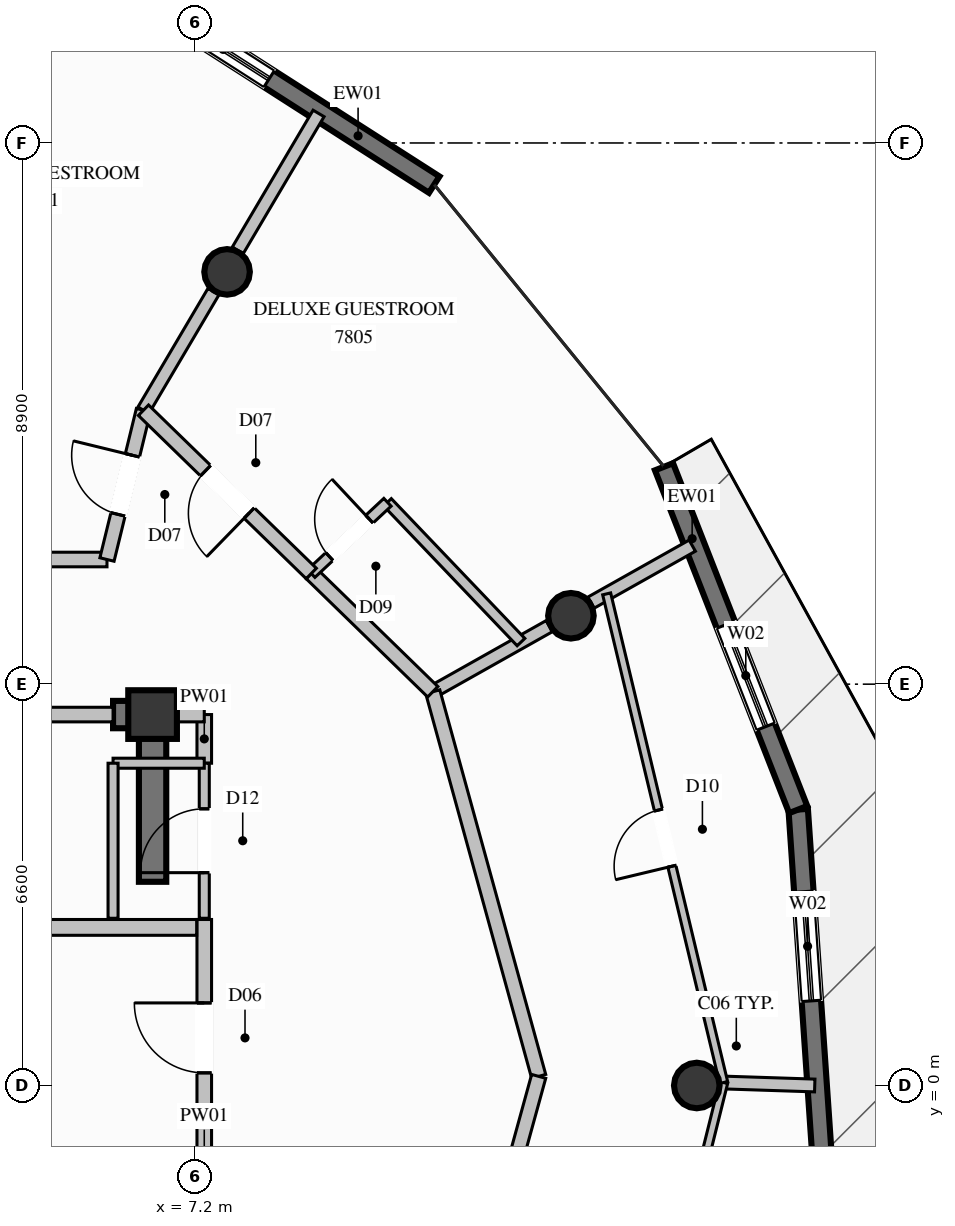
"""IFC4 building model, lengths in metres.
Left out: names, types, materials, properties, quantities, classifications, styles, units other than length and angle.
Written with IfcOpenShell. Run it as: python <this file> out.ifc"""

import sys

from ifc_helpers import new_model, si_unit, direction, frame, frame_2d, origin, origin_2d, place, context, subcontext, project, spatial, rectangle, circle, extrude, element, fill, save


model = new_model("IFC4")
c1 = context("Model", 3, precision=1e-05, world=origin(), true_north=direction((0.0, 1.0)))
c2 = subcontext(c1, "Body", "Model", "MODEL_VIEW")
j1 = project(units=[si_unit("LENGTHUNIT", "METRE"), si_unit("PLANEANGLEUNIT", "RADIAN")], contexts=[c1])
p1 = place(None, origin())
s1 = spatial("IfcSite", under=j1, at=p1, CompositionType="ELEMENT")
p2 = place(p1, origin())
s2 = spatial("IfcBuilding", under=s1, at=p2, CompositionType="ELEMENT")
p3 = place(p2, frame((0.0, 0.0, 293.4)))
s3 = spatial("IfcBuildingStorey", under=s2, at=p3, CompositionType="ELEMENT", Elevation=293.4)
p4 = place(p3, frame((6.5, 6.1, 0.0), z_axis=(0.0, 0.0, 1.0), x_axis=(1.0, 0.0, 0.0)))
e1 = element("IfcColumn", 1, at=p4, inside=s3, PredefinedType="COLUMN", context=c2, shape_type="SweptSolid", body=[
    extrude(rectangle(XDim=0.8, YDim=0.8, at=origin_2d()), origin(), (0.0, 0.0, 1.0), 3.8),
])
p5 = place(p3, frame((5.85, 6.1, 0.0), z_axis=(0.0, 0.0, 1.0), x_axis=(1.0, 0.0, 0.0)))
e2 = element("IfcWall", 2, at=p5, inside=s3, PredefinedType="SHEAR", context=c2, shape_type="SweptSolid", body=[
    extrude(rectangle(XDim=0.425, YDim=0.45, at=frame_2d((0.212, 0.0))), origin(), (0.0, 0.0, 1.0), 3.8),
])
p6 = place(p3, frame((6.5, 3.35, 0.0), z_axis=(0.0, 0.0, 1.0), x_axis=(0.0, 1.0, 0.0)))
e3 = element("IfcWall", 3, at=p6, inside=s3, PredefinedType="SHEAR", context=c2, shape_type="SweptSolid", body=[
    extrude(rectangle(XDim=2.975, YDim=0.45, at=frame_2d((1.487, 0.0))), origin(), (0.0, 0.0, 1.0), 3.8),
])
for number, where, z_axis, x_axis in (
    (4, (15.45, 0.0, 0.0), (0.0, 0.0, 1.0), (1.0, 0.0, 0.0)),
    (5, (13.38, 7.725, 0.0), (0.0, 0.0, 1.0), (1.0, 0.0, 0.0)),
    (6, (7.725, 13.38, 0.0), (0.0, 0.0, 1.0), (1.0, 0.0, 0.0)),
):
    element("IfcColumn", number, at=place(p3, frame(where, z_axis=z_axis, x_axis=x_axis)), inside=s3, PredefinedType="COLUMN", context=c2, shape_type="SweptSolid", body=[
        extrude(circle(Radius=0.375, at=origin_2d()), origin(), (0.0, 0.0, 1.0), 3.8),
    ])
p7 = place(p3, frame((17.118, 4.538, 0.0), z_axis=(0.0, 0.0, 1.0), x_axis=(0.068571155559, -0.997646228192, 0.0)))
e7 = element("IfcWall", 7, at=p7, inside=s3, PredefinedType="SOLIDWALL", context=c2, shape_type="SweptSolid", body=[
    extrude(rectangle(XDim=6.095, YDim=0.32, at=frame_2d((3.048, 0.0))), origin(), (0.0, 0.0, 1.0), 3.57),
])
p8 = place(p7, frame((1.354, 0.0, 0.35)))
e8 = element("IfcOpeningElement", 8, at=p8, cuts=e7, PredefinedType="OPENING", context=c2, shape_type="SweptSolid", body=[
    extrude(rectangle(XDim=1.8, YDim=2.6, at=frame_2d((0.9, 1.3))), frame((0.0, 0.17, 0.0), z_axis=(0.0, -1.0, 0.0), x_axis=(1.0, 0.0, 0.0)), (0.0, 0.0, 1.0), 0.34),
])
p9 = place(p3, frame((14.911, 10.175, 0.0), z_axis=(0.0, 0.0, 1.0), x_axis=(0.364580296342, -0.931171953787, 0.0)))
e9 = element("IfcWall", 9, at=p9, inside=s3, PredefinedType="SOLIDWALL", context=c2, shape_type="SweptSolid", body=[
    extrude(rectangle(XDim=6.054, YDim=0.32, at=frame_2d((3.027, 0.0))), origin(), (0.0, 0.0, 1.0), 3.57),
])
p10 = place(p9, frame((2.789, 0.0, 0.35)))
e10 = element("IfcOpeningElement", 10, at=p10, cuts=e9, PredefinedType="OPENING", context=c2, shape_type="SweptSolid", body=[
    extrude(rectangle(XDim=1.8, YDim=2.6, at=frame_2d((0.9, 1.3))), frame((0.0, 0.17, 0.0), z_axis=(0.0, -1.0, 0.0), x_axis=(1.0, 0.0, 0.0)), (0.0, 0.0, 1.0), 0.34),
])
p11 = place(p3, frame((6.15, 18.006, 0.0), z_axis=(0.0, 0.0, 1.0), x_axis=(0.842074251432, -0.539361618095, 0.0)))
e11 = element("IfcWall", 11, at=p11, inside=s3, PredefinedType="SOLIDWALL", context=c2, shape_type="SweptSolid", body=[
    extrude(rectangle(XDim=5.917, YDim=0.32, at=frame_2d((2.958, 0.0))), origin(), (0.0, 0.0, 1.0), 3.57),
])
p12 = place(p11, frame((0.892, 0.0, 0.35)))
e12 = element("IfcOpeningElement", 12, at=p12, cuts=e11, PredefinedType="OPENING", context=c2, shape_type="SweptSolid", body=[
    extrude(rectangle(XDim=1.8, YDim=2.6, at=frame_2d((0.9, 1.3))), frame((0.0, 0.17, 0.0), z_axis=(0.0, -1.0, 0.0), x_axis=(1.0, 0.0, 0.0)), (0.0, 0.0, 1.0), 0.34),
])
p13 = place(p3, frame((7.35, -2.34, 0.0), z_axis=(0.0, 0.0, 1.0), x_axis=(0.0, 1.0, 0.0)))
e13 = element("IfcWall", 13, at=p13, inside=s3, PredefinedType="PARTITIONING", context=c2, shape_type="SweptSolid", body=[
    extrude(rectangle(XDim=5.07, YDim=0.24, at=frame_2d((2.535, 0.0))), origin(), (0.0, 0.0, 1.0), 2.655),
])
p14 = place(p13, frame((2.548, 0.0, 0.0)))
e14 = element("IfcOpeningElement", 14, at=p14, cuts=e13, PredefinedType="OPENING", context=c2, shape_type="SweptSolid", body=[
    extrude(rectangle(XDim=1.15, YDim=2.2, at=frame_2d((0.575, 1.1))), frame((0.0, 0.13, 0.0), z_axis=(0.0, -1.0, 0.0), x_axis=(1.0, 0.0, 0.0)), (0.0, 0.0, 1.0), 0.26),
])
p15 = place(p3, frame((4.13, 2.6, 0.0), z_axis=(0.0, 0.0, 1.0), x_axis=(1.0, 0.0, 0.0)))
e15 = element("IfcWall", 15, at=p15, inside=s3, PredefinedType="PARTITIONING", context=c2, shape_type="SweptSolid", body=[
    extrude(rectangle(XDim=3.095, YDim=0.26, at=frame_2d((1.548, 0.0))), origin(), (0.0, 0.0, 1.0), 3.57),
])
p16 = place(p3, frame((-7.35, 8.65, 0.0), z_axis=(0.0, 0.0, 1.0), x_axis=(1.0, 0.0, 0.0)))
e16 = element("IfcWall", 16, at=p16, inside=s3, PredefinedType="PARTITIONING", context=c2, shape_type="SweptSolid", body=[
    extrude(rectangle(XDim=13.1, YDim=0.24, at=frame_2d((6.55, 0.0))), origin(), (0.0, 0.0, 1.0), 3.57),
])
p17 = place(p3, frame((3.0, 6.1, 0.0), z_axis=(0.0, 0.0, 1.0), x_axis=(1.0, 0.0, 0.0)))
e17 = element("IfcWall", 17, at=p17, inside=s3, PredefinedType="PARTITIONING", context=c2, shape_type="SweptSolid", body=[
    extrude(rectangle(XDim=2.85, YDim=0.24, at=frame_2d((1.425, 0.0))), origin(), (0.0, 0.0, 1.0), 2.655),
])
p18 = place(p3, frame((7.35, 5.3, 0.0), z_axis=(0.0, 0.0, 1.0), x_axis=(0.0, 1.0, 0.0)))
e18 = element("IfcWall", 18, at=p18, inside=s3, PredefinedType="PARTITIONING", context=c2, shape_type="SweptSolid", body=[
    extrude(rectangle(XDim=0.8, YDim=0.24, at=frame_2d((0.4, 0.0))), origin(), (0.0, 0.0, 1.0), 2.655),
])
p19 = place(p3, frame((6.5, 6.1, 0.0), z_axis=(0.0, 0.0, 1.0), x_axis=(1.0, 0.0, 0.0)))
e19 = element("IfcWall", 19, at=p19, inside=s3, PredefinedType="PARTITIONING", context=c2, shape_type="SweptSolid", body=[
    extrude(rectangle(XDim=0.85, YDim=0.24, at=frame_2d((0.425, 0.0))), origin(), (0.0, 0.0, 1.0), 3.011),
])
p20 = place(p3, frame((7.35, 2.75, 0.0), z_axis=(0.0, 0.0, 1.0), x_axis=(0.0, 1.0, 0.0)))
e20 = element("IfcWall", 20, at=p20, inside=s3, PredefinedType="PARTITIONING", context=c2, shape_type="SweptSolid", body=[
    extrude(rectangle(XDim=2.55, YDim=0.165, at=frame_2d((1.275, 0.0))), origin(), (0.0, 0.0, 1.0), 3.57),
])
p21 = place(p20, frame((0.75, 0.0, 0.0)))
e21 = element("IfcOpeningElement", 21, at=p21, cuts=e20, PredefinedType="OPENING", context=c2, shape_type="SweptSolid", body=[
    extrude(rectangle(XDim=1.05, YDim=2.15, at=frame_2d((0.525, 1.075))), frame((0.0, 0.093, 0.0), z_axis=(0.0, -1.0, 0.0), x_axis=(1.0, 0.0, 0.0)), (0.0, 0.0, 1.0), 0.185),
])
p22 = place(p3, frame((7.35, 5.3, 0.0), z_axis=(0.0, 0.0, 1.0), x_axis=(-1.0, 0.0, 0.0)))
e22 = element("IfcWall", 22, at=p22, inside=s3, PredefinedType="PARTITIONING", context=c2, shape_type="SweptSolid", body=[
    extrude(rectangle(XDim=1.5, YDim=0.165, at=frame_2d((0.75, 0.0))), origin(), (0.0, 0.0, 1.0), 2.655),
])
p23 = place(p3, frame((5.85, 5.3, 0.0), z_axis=(0.0, 0.0, 1.0), x_axis=(0.0, -1.0, 0.0)))
e23 = element("IfcWall", 23, at=p23, inside=s3, PredefinedType="PARTITIONING", context=c2, shape_type="SweptSolid", body=[
    extrude(rectangle(XDim=2.55, YDim=0.165, at=frame_2d((1.275, 0.0))), origin(), (0.0, 0.0, 1.0), 2.655),
])
p24 = place(p3, frame((11.108, 6.475, 0.0), z_axis=(0.0, 0.0, 1.0), x_axis=(0.87136196096, 0.490640737192, 0.0)))
e24 = element("IfcWall", 24, at=p24, inside=s3, PredefinedType="PARTITIONING", context=c2, shape_type="SweptSolid", body=[
    extrude(rectangle(XDim=2.199, YDim=0.21, at=frame_2d((1.1, 0.0))), origin(), (0.0, 0.0, 1.0), 3.011),
])
p25 = place(p3, frame((13.711, 7.941, 0.0), z_axis=(0.0, 0.0, 1.0), x_axis=(0.871479967714, 0.490431102065, 0.0)))
e25 = element("IfcWall", 25, at=p25, inside=s3, PredefinedType="PARTITIONING", context=c2, shape_type="SweptSolid", body=[
    extrude(rectangle(XDim=1.911, YDim=0.21, at=frame_2d((0.955, 0.0))), origin(), (0.0, 0.0, 1.0), 3.57),
])
p26 = place(p3, frame((6.35, 11.105, 0.0), z_axis=(0.0, 0.0, 1.0), x_axis=(0.50828242616, 0.86119044076, 0.0)))
e26 = element("IfcWall", 26, at=p26, inside=s3, PredefinedType="PARTITIONING", context=c2, shape_type="SweptSolid", body=[
    extrude(rectangle(XDim=2.264, YDim=0.21, at=frame_2d((1.132, 0.0))), origin(), (0.0, 0.0, 1.0), 3.011),
])
p27 = place(p3, frame((7.901, 13.734, 0.0), z_axis=(0.0, 0.0, 1.0), x_axis=(0.508235422894, 0.861218180786, 0.0)))
e27 = element("IfcWall", 27, at=p27, inside=s3, PredefinedType="PARTITIONING", context=c2, shape_type="SweptSolid", body=[
    extrude(rectangle(XDim=2.615, YDim=0.21, at=frame_2d((1.308, 0.0))), origin(), (0.0, 0.0, 1.0), 3.57),
])
p28 = place(p3, frame((5.75, 8.65, 0.0), z_axis=(0.0, 0.0, 1.0), x_axis=(0.237440936779, 0.97140197732, 0.0)))
e28 = element("IfcWall", 28, at=p28, inside=s3, PredefinedType="PARTITIONING", context=c2, shape_type="SweptSolid", body=[
    extrude(rectangle(XDim=2.527, YDim=0.24, at=frame_2d((1.264, 0.0))), origin(), (0.0, 0.0, 1.0), 3.57),
])
p29 = place(p28, frame((0.764, 0.0, 0.0)))
e29 = element("IfcOpeningElement", 29, at=p29, cuts=e28, PredefinedType="OPENING", context=c2, shape_type="SweptSolid", body=[
    extrude(rectangle(XDim=1.0, YDim=2.2, at=frame_2d((0.5, 1.1))), frame((0.0, 0.13, 0.0), z_axis=(0.0, -1.0, 0.0), x_axis=(1.0, 0.0, 0.0)), (0.0, 0.0, 1.0), 0.26),
])
p30 = place(p3, frame((15.892, 0.049, 0.0), z_axis=(0.0, 0.0, 1.0), x_axis=(0.99946372997, -0.032745266459, 0.0)))
e30 = element("IfcWall", 30, at=p30, inside=s3, PredefinedType="PARTITIONING", context=c2, shape_type="SweptSolid", body=[
    extrude(rectangle(XDim=1.499, YDim=0.21, at=frame_2d((0.749, 0.0))), origin(), (0.0, 0.0, 1.0), 3.57),
])
p31 = place(p3, frame((12.85, 0.15, 0.0), z_axis=(0.0, 0.0, 1.0), x_axis=(-0.265547396414, 0.964097806375, 0.0)))
e31 = element("IfcWall", 31, at=p31, inside=s3, PredefinedType="PARTITIONING", context=c2, shape_type="SweptSolid", body=[
    extrude(rectangle(XDim=6.561, YDim=0.24, at=frame_2d((3.28, 0.0))), origin(), (0.0, 0.0, 1.0), 3.57),
])
p32 = place(p3, frame((11.84, -3.518, 0.0), z_axis=(0.0, 0.0, 1.0), x_axis=(0.265478632156, 0.9641167439, 0.0)))
e32 = element("IfcWall", 32, at=p32, inside=s3, PredefinedType="PARTITIONING", context=c2, shape_type="SweptSolid", body=[
    extrude(rectangle(XDim=3.804, YDim=0.24, at=frame_2d((1.902, 0.0))), origin(), (0.0, 0.0, 1.0), 3.57),
])
p33 = place(p32, frame((1.352, 0.0, 0.0)))
e33 = element("IfcOpeningElement", 33, at=p33, cuts=e32, PredefinedType="OPENING", context=c2, shape_type="SweptSolid", body=[
    extrude(rectangle(XDim=1.1, YDim=2.3, at=frame_2d((0.55, 1.15))), frame((0.0, 0.13, 0.0), z_axis=(0.0, -1.0, 0.0), x_axis=(1.0, 0.0, 0.0)), (0.0, 0.0, 1.0), 0.26),
])
p34 = place(p3, frame((13.901, -7.947, 0.0), z_axis=(0.0, 0.0, 1.0), x_axis=(0.241643206993, 0.970365168642, 0.0)))
e34 = element("IfcWall", 34, at=p34, inside=s3, PredefinedType="PARTITIONING", context=c2, shape_type="SweptSolid", body=[
    extrude(rectangle(XDim=8.24, YDim=0.135, at=frame_2d((4.12, 0.0))), origin(), (0.0, 0.0, 1.0), 3.138),
])
p35 = place(p34, frame((3.645, 0.0, 0.0)))
e35 = element("IfcOpeningElement", 35, at=p35, cuts=e34, PredefinedType="OPENING", context=c2, shape_type="SweptSolid", body=[
    extrude(rectangle(XDim=0.95, YDim=2.1, at=frame_2d((0.475, 1.05))), frame((0.0, 0.078, 0.0), z_axis=(0.0, -1.0, 0.0), x_axis=(1.0, 0.0, 0.0)), (0.0, 0.0, 1.0), 0.155),
])
p36 = place(p3, frame((15.892, 0.049, 0.0), z_axis=(0.0, 0.0, 1.0), x_axis=(-0.232853291141, 0.972511873863, 0.0)))
e36 = element("IfcWall", 36, at=p36, inside=s3, PredefinedType="PARTITIONING", context=c2, shape_type="SweptSolid", body=[
    extrude(rectangle(XDim=8.263, YDim=0.135, at=frame_2d((4.131, 0.0))), origin(), (0.0, 0.0, 1.0), 3.138),
])
p37 = place(p36, frame((3.657, 0.0, 0.0)))
e37 = element("IfcOpeningElement", 37, at=p37, cuts=e36, PredefinedType="OPENING", context=c2, shape_type="SweptSolid", body=[
    extrude(rectangle(XDim=0.95, YDim=2.1, at=frame_2d((0.475, 1.05))), frame((0.0, 0.078, 0.0), z_axis=(0.0, -1.0, 0.0), x_axis=(1.0, 0.0, 0.0)), (0.0, 0.0, 1.0), 0.155),
])
p38 = place(p3, frame((11.108, 6.475, 0.0), z_axis=(0.0, 0.0, 1.0), x_axis=(-0.716543745136, 0.697542157369, 0.0)))
e38 = element("IfcWall", 38, at=p38, inside=s3, PredefinedType="PARTITIONING", context=c2, shape_type="SweptSolid", body=[
    extrude(rectangle(XDim=2.788, YDim=0.24, at=frame_2d((1.394, 0.0))), origin(), (0.0, 0.0, 1.0), 3.57),
])
p39 = place(p3, frame((12.559, 7.292, 0.0), z_axis=(0.0, 0.0, 1.0), x_axis=(-0.690718610585, 0.723123641566, 0.0)))
e39 = element("IfcWall", 39, at=p39, inside=s3, PredefinedType="PLUMBINGWALL", context=c2, shape_type="SweptSolid", body=[
    extrude(rectangle(XDim=3.179, YDim=0.175, at=frame_2d((1.59, 0.0))), origin(), (0.0, 0.0, 1.0), 3.57),
])
p40 = place(p3, frame((9.11, 8.42, 0.0), z_axis=(0.0, 0.0, 1.0), x_axis=(0.730548551993, 0.682860756803, 0.0)))
e40 = element("IfcWall", 40, at=p40, inside=s3, PredefinedType="PLUMBINGWALL", context=c2, shape_type="SweptSolid", body=[
    extrude(rectangle(XDim=1.715, YDim=0.175, at=frame_2d((0.857, 0.0))), origin(), (0.0, 0.0, 1.0), 3.57),
])
p41 = place(p40, frame((0.408, 0.0, 0.0)))
e41 = element("IfcOpeningElement", 41, at=p41, cuts=e40, PredefinedType="OPENING", context=c2, shape_type="SweptSolid", body=[
    extrude(rectangle(XDim=0.9, YDim=2.1, at=frame_2d((0.45, 1.05))), frame((0.0, 0.098, 0.0), z_axis=(0.0, -1.0, 0.0), x_axis=(1.0, 0.0, 0.0)), (0.0, 0.0, 1.0), 0.195),
])
p42 = place(p3, frame((9.11, 8.42, 0.0), z_axis=(0.0, 0.0, 1.0), x_axis=(-0.716772179107, 0.697307423779, 0.0)))
e42 = element("IfcWall", 42, at=p42, inside=s3, PredefinedType="PARTITIONING", context=c2, shape_type="SweptSolid", body=[
    extrude(rectangle(XDim=3.851, YDim=0.24, at=frame_2d((1.925, 0.0))), origin(), (0.0, 0.0, 1.0), 3.57),
])
p43 = place(p42, frame((1.425, 0.0, 0.0)))
e43 = element("IfcOpeningElement", 43, at=p43, cuts=e42, PredefinedType="OPENING", context=c2, shape_type="SweptSolid", body=[
    extrude(rectangle(XDim=1.0, YDim=2.2, at=frame_2d((0.5, 1.1))), frame((0.0, 0.13, 0.0), z_axis=(0.0, -1.0, 0.0), x_axis=(1.0, 0.0, 0.0)), (0.0, 0.0, 1.0), 0.26),
])
p44 = place(p8, origin())
e44 = element("IfcWindow", 44, at=p44, inside=s3, PartitioningType="SINGLE_PANEL", PredefinedType="WINDOW", context=c2, shape_type="SweptSolid", body=[
    extrude(rectangle(XDim=1.8, YDim=2.6, at=frame_2d((0.9, 1.3))), frame((0.0, 0.03, 0.0), z_axis=(0.0, -1.0, 0.0), x_axis=(1.0, 0.0, 0.0)), (0.0, 0.0, 1.0), 0.06),
])
fill(e8, e44)
p45 = place(p10, origin())
e45 = element("IfcWindow", 45, at=p45, inside=s3, PartitioningType="SINGLE_PANEL", PredefinedType="WINDOW", context=c2, shape_type="SweptSolid", body=[
    extrude(rectangle(XDim=1.8, YDim=2.6, at=frame_2d((0.9, 1.3))), frame((0.0, 0.03, 0.0), z_axis=(0.0, -1.0, 0.0), x_axis=(1.0, 0.0, 0.0)), (0.0, 0.0, 1.0), 0.06),
])
fill(e10, e45)
p46 = place(p12, origin())
e46 = element("IfcWindow", 46, at=p46, inside=s3, PartitioningType="SINGLE_PANEL", PredefinedType="WINDOW", context=c2, shape_type="SweptSolid", body=[
    extrude(rectangle(XDim=1.8, YDim=2.6, at=frame_2d((0.9, 1.3))), frame((0.0, 0.03, 0.0), z_axis=(0.0, -1.0, 0.0), x_axis=(1.0, 0.0, 0.0)), (0.0, 0.0, 1.0), 0.06),
])
fill(e12, e46)
p47 = place(p14, origin())
e47 = element("IfcDoor", 47, at=p47, inside=s3, OperationType="SINGLE_SWING_RIGHT", PredefinedType="DOOR", context=c2, shape_type="SweptSolid", body=[
    extrude(rectangle(XDim=1.15, YDim=2.2, at=frame_2d((0.575, 1.1))), frame((0.0, 0.025, 0.0), z_axis=(0.0, -1.0, 0.0), x_axis=(1.0, 0.0, 0.0)), (0.0, 0.0, 1.0), 0.05),
])
fill(e14, e47)
p48 = place(p21, origin())
e48 = element("IfcDoor", 48, at=p48, inside=s3, OperationType="SINGLE_SWING_LEFT", PredefinedType="DOOR", context=c2, shape_type="SweptSolid", body=[
    extrude(rectangle(XDim=1.05, YDim=2.15, at=frame_2d((0.525, 1.075))), frame((0.0, 0.025, 0.0), z_axis=(0.0, -1.0, 0.0), x_axis=(1.0, 0.0, 0.0)), (0.0, 0.0, 1.0), 0.05),
])
fill(e21, e48)
p49 = place(p29, origin())
e49 = element("IfcDoor", 49, at=p49, inside=s3, OperationType="SINGLE_SWING_RIGHT", PredefinedType="DOOR", context=c2, shape_type="SweptSolid", body=[
    extrude(rectangle(XDim=1.0, YDim=2.2, at=frame_2d((0.5, 1.1))), frame((0.0, 0.025, 0.0), z_axis=(0.0, -1.0, 0.0), x_axis=(1.0, 0.0, 0.0)), (0.0, 0.0, 1.0), 0.05),
])
fill(e29, e49)
p50 = place(p37, origin())
e50 = element("IfcDoor", 50, at=p50, inside=s3, OperationType="SINGLE_SWING_LEFT", PredefinedType="DOOR", context=c2, shape_type="SweptSolid", body=[
    extrude(rectangle(XDim=0.95, YDim=2.1, at=frame_2d((0.475, 1.05))), frame((0.0, 0.025, 0.0), z_axis=(0.0, -1.0, 0.0), x_axis=(1.0, 0.0, 0.0)), (0.0, 0.0, 1.0), 0.05),
])
fill(e37, e50)
p51 = place(p41, origin())
e51 = element("IfcDoor", 51, at=p51, inside=s3, OperationType="SINGLE_SWING_RIGHT", PredefinedType="DOOR", context=c2, shape_type="SweptSolid", body=[
    extrude(rectangle(XDim=0.9, YDim=2.1, at=frame_2d((0.45, 1.05))), frame((0.0, 0.025, 0.0), z_axis=(0.0, -1.0, 0.0), x_axis=(1.0, 0.0, 0.0)), (0.0, 0.0, 1.0), 0.05),
])
fill(e41, e51)
p52 = place(p43, origin())
e52 = element("IfcDoor", 52, at=p52, inside=s3, OperationType="SINGLE_SWING_LEFT", PredefinedType="DOOR", context=c2, shape_type="SweptSolid", body=[
    extrude(rectangle(XDim=1.0, YDim=2.2, at=frame_2d((0.5, 1.1))), frame((0.0, 0.025, 0.0), z_axis=(0.0, -1.0, 0.0), x_axis=(1.0, 0.0, 0.0)), (0.0, 0.0, 1.0), 0.05),
])
fill(e43, e52)
save(model, sys.argv[1])
